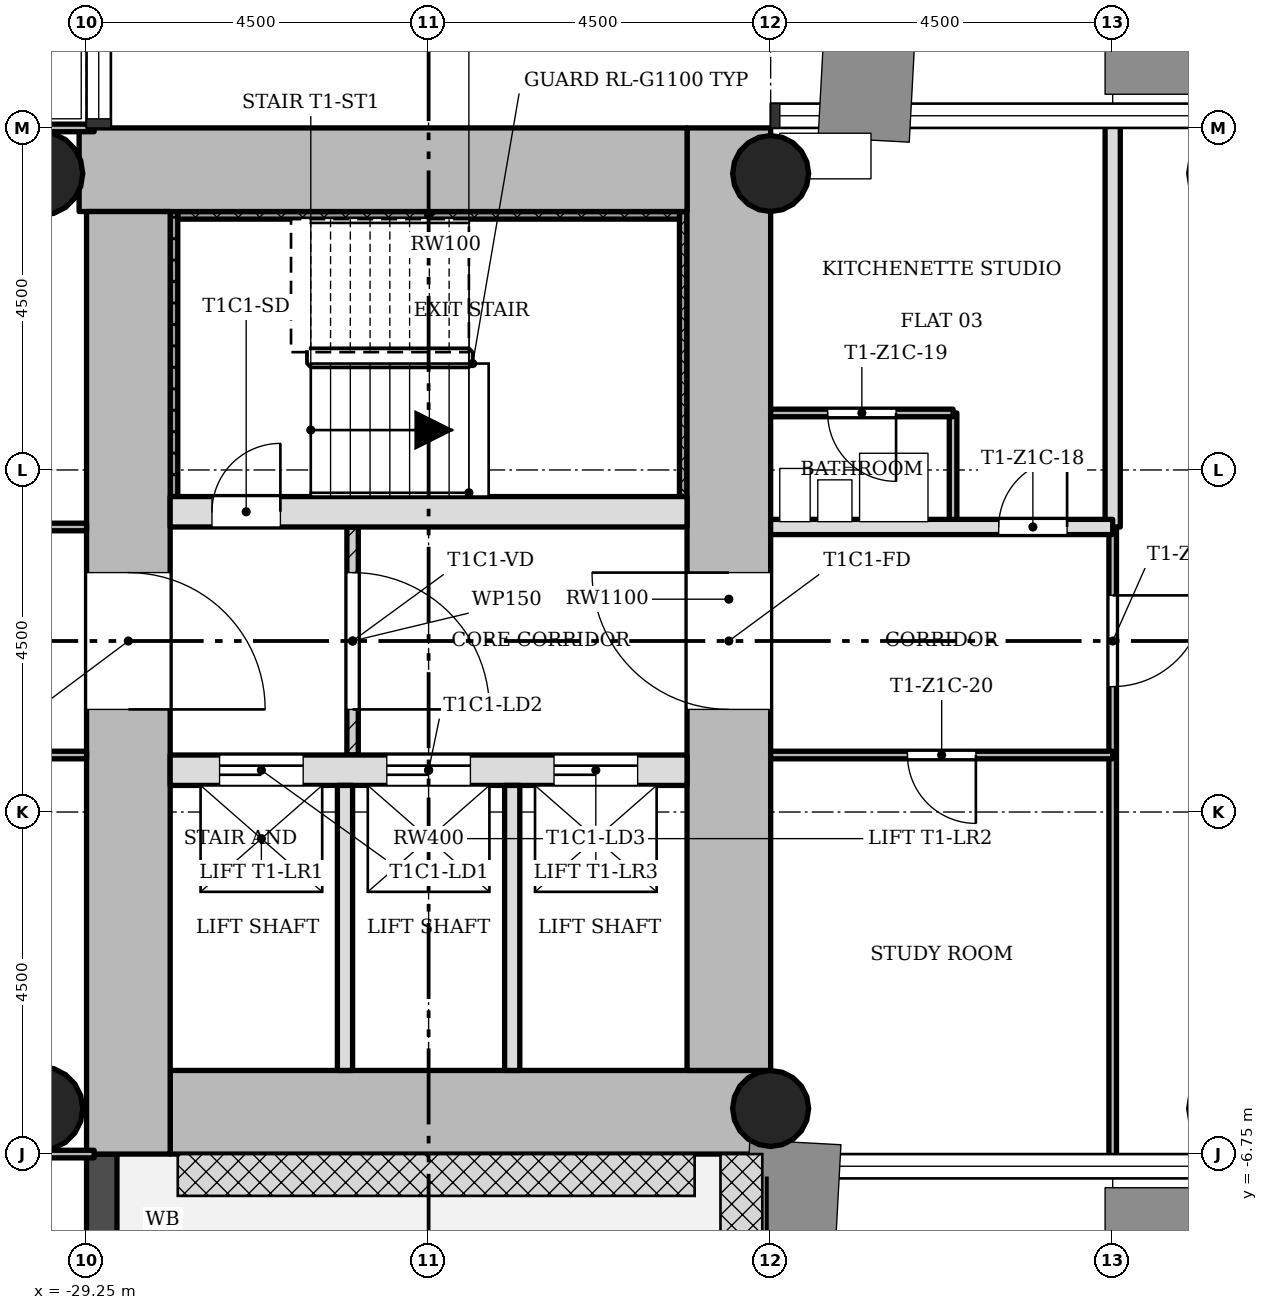
"""IFC4 building model, lengths in metres.
Left out: names, types, materials, properties, quantities, classifications, styles, units other than length and angle.
Written with IfcOpenShell. Run it as: python <this file> out.ifc"""

import sys

from ifc_helpers import new_model, si_unit, direction, frame, frame_2d, origin, origin_2d, place, context, subcontext, project, spatial, rectangle, hollow_circle, extrude, element, fill, save


model = new_model("IFC4")
c1 = context("Model", 3, precision=1e-05, world=origin(), true_north=direction((0.0, 1.0)))
c2 = subcontext(c1, "Body", "Model", "MODEL_VIEW")
j1 = project(units=[si_unit("LENGTHUNIT", "METRE"), si_unit("PLANEANGLEUNIT", "RADIAN")], contexts=[c1])
p1 = place(None, origin())
s1 = spatial("IfcSite", under=j1, at=p1, CompositionType="ELEMENT")
p2 = place(p1, origin())
s2 = spatial("IfcBuilding", under=s1, at=p2, CompositionType="ELEMENT")
p3 = place(p2, frame((0.0, 0.0, 44.9)))
s3 = spatial("IfcBuildingStorey", under=s2, at=p3, CompositionType="ELEMENT", Elevation=44.9)
p4 = place(p3, frame((-28.15, -6.2, 0.0), z_axis=(0.0, 0.0, 1.0), x_axis=(1.0, 0.0, 0.0)))
e1 = element("IfcWall", 1, at=p4, inside=s3, PredefinedType="SHEAR", context=c2, shape_type="SweptSolid", body=[
    extrude(rectangle(XDim=7.9, YDim=1.1, at=frame_2d((3.95, 0.0))), origin(), (0.0, 0.0, 1.0), 3.4),
])
p5 = place(p3, frame((-20.8, -5.65, 0.0), z_axis=(0.0, 0.0, 1.0), x_axis=(0.0, 1.0, 0.0)))
e2 = element("IfcWall", 2, at=p5, inside=s3, PredefinedType="SHEAR", context=c2, shape_type="SweptSolid", body=[
    extrude(rectangle(XDim=12.4, YDim=1.1, at=frame_2d((6.2, 0.0))), origin(), (0.0, 0.0, 1.0), 3.4),
])
p6 = place(p5, frame((4.75, 0.0, 0.0)))
e3 = element("IfcOpeningElement", 3, at=p6, cuts=e2, PredefinedType="OPENING", context=c2, shape_type="SweptSolid", body=[
    extrude(rectangle(XDim=1.8, YDim=2.1, at=frame_2d((0.9, 1.05))), frame((0.0, 0.56, 0.0), z_axis=(0.0, -1.0, 0.0), x_axis=(1.0, 0.0, 0.0)), (0.0, 0.0, 1.0), 1.12),
])
p7 = place(p3, frame((-21.35, 6.2, 0.0), z_axis=(0.0, 0.0, 1.0), x_axis=(-1.0, 0.0, 0.0)))
e4 = element("IfcWall", 4, at=p7, inside=s3, PredefinedType="SHEAR", context=c2, shape_type="SweptSolid", body=[
    extrude(rectangle(XDim=7.998, YDim=1.1, at=frame_2d((3.999, 0.0))), origin(), (0.0, 0.0, 1.0), 3.4),
])
p8 = place(p3, frame((-28.7, 5.65, 0.0), z_axis=(0.0, 0.0, 1.0), x_axis=(0.0, -1.0, 0.0)))
e5 = element("IfcWall", 5, at=p8, inside=s3, PredefinedType="SHEAR", context=c2, shape_type="SweptSolid", body=[
    extrude(rectangle(XDim=12.4, YDim=1.1, at=frame_2d((6.2, 0.0))), origin(), (0.0, 0.0, 1.0), 3.4),
])
p9 = place(p8, frame((4.75, 0.0, 0.0)))
e6 = element("IfcOpeningElement", 6, at=p9, cuts=e5, PredefinedType="OPENING", context=c2, shape_type="SweptSolid", body=[
    extrude(rectangle(XDim=1.8, YDim=2.1, at=frame_2d((0.9, 1.05))), frame((0.0, 0.56, 0.0), z_axis=(0.0, -1.0, 0.0), x_axis=(1.0, 0.0, 0.0)), (0.0, 0.0, 1.0), 1.12),
])
p10 = place(p3, frame((-28.15, -1.7, 0.0), z_axis=(0.0, 0.0, 1.0), x_axis=(1.0, 0.0, 0.0)))
e7 = element("IfcWall", 7, at=p10, inside=s3, PredefinedType="SHEAR", context=c2, shape_type="SweptSolid", body=[
    extrude(rectangle(XDim=6.8, YDim=0.4, at=frame_2d((3.4, 0.0))), origin(), (0.0, 0.0, 1.0), 3.4),
])
p11 = place(p10, frame((0.65, 0.0, 0.0)))
e8 = element("IfcOpeningElement", 8, at=p11, cuts=e7, PredefinedType="OPENING", context=c2, shape_type="SweptSolid", body=[
    extrude(rectangle(XDim=1.1, YDim=2.1, at=frame_2d((0.55, 1.05))), frame((0.0, 0.21, 0.0), z_axis=(0.0, -1.0, 0.0), x_axis=(1.0, 0.0, 0.0)), (0.0, 0.0, 1.0), 0.42),
])
p12 = place(p10, frame((2.85, 0.0, 0.0)))
e9 = element("IfcOpeningElement", 9, at=p12, cuts=e7, PredefinedType="OPENING", context=c2, shape_type="SweptSolid", body=[
    extrude(rectangle(XDim=1.1, YDim=2.1, at=frame_2d((0.55, 1.05))), frame((0.0, 0.21, 0.0), z_axis=(0.0, -1.0, 0.0), x_axis=(1.0, 0.0, 0.0)), (0.0, 0.0, 1.0), 0.42),
])
p13 = place(p10, frame((5.05, 0.0, 0.0)))
e10 = element("IfcOpeningElement", 10, at=p13, cuts=e7, PredefinedType="OPENING", context=c2, shape_type="SweptSolid", body=[
    extrude(rectangle(XDim=1.1, YDim=2.1, at=frame_2d((0.55, 1.05))), frame((0.0, 0.21, 0.0), z_axis=(0.0, -1.0, 0.0), x_axis=(1.0, 0.0, 0.0)), (0.0, 0.0, 1.0), 0.42),
])
p14 = place(p3, frame((-28.15, 1.7, 0.0), z_axis=(0.0, 0.0, 1.0), x_axis=(1.0, 0.0, 0.0)))
e11 = element("IfcWall", 11, at=p14, inside=s3, PredefinedType="SHEAR", context=c2, shape_type="SweptSolid", body=[
    extrude(rectangle(XDim=6.8, YDim=0.4, at=frame_2d((3.4, 0.0))), origin(), (0.0, 0.0, 1.0), 3.4),
])
p15 = place(p14, frame((0.55, 0.0, 0.0)))
e12 = element("IfcOpeningElement", 12, at=p15, cuts=e11, PredefinedType="OPENING", context=c2, shape_type="SweptSolid", body=[
    extrude(rectangle(XDim=0.9, YDim=2.1, at=frame_2d((0.45, 1.05))), frame((0.0, 0.21, 0.0), z_axis=(0.0, -1.0, 0.0), x_axis=(1.0, 0.0, 0.0)), (0.0, 0.0, 1.0), 0.42),
])
for number, where, z_axis, x_axis in (
    (13, (-20.25, -6.15, 0.0), (0.0, 0.0, 1.0), (1.0, 0.0, 0.0)),
    (14, (-20.25, 6.15, 0.0), (0.0, 0.0, 1.0), (1.0, 0.0, 0.0)),
):
    element("IfcColumn", number, at=place(p3, frame(where, z_axis=z_axis, x_axis=x_axis)), inside=s3, PredefinedType="COLUMN", context=c2, shape_type="SweptSolid", body=[
        extrude(hollow_circle(Radius=0.5, WallThickness=0.036, at=origin_2d()), origin(), (0.0, 0.0, 1.0), 3.4),
    ])
for number, where, z_axis, x_axis in (
    (15, (-29.85, -6.15, 0.0), (0.0, 0.0, 1.0), (1.0, 0.0, 0.0)),
    (16, (-29.85, 6.15, 0.0), (0.0, 0.0, 1.0), (1.0, 0.0, 0.0)),
):
    element("IfcColumn", number, at=place(p3, frame(where, z_axis=z_axis, x_axis=x_axis)), inside=s3, PredefinedType="COLUMN", context=c2, shape_type="SweptSolid", body=[
        extrude(hollow_circle(Radius=0.55, WallThickness=0.04, at=origin_2d()), origin(), (0.0, 0.0, 1.0), 3.4),
    ])
p16 = place(p3, frame((-29.05, -11.25, -0.02), z_axis=(0.0, 0.0, 1.0), x_axis=(0.0, 1.0, 0.0)))
e17 = element("IfcWall", 17, at=p16, inside=s3, PredefinedType="STANDARD", context=c2, shape_type="SweptSolid", body=[
    extrude(rectangle(XDim=4.5, YDim=0.4, at=frame_2d((2.25, 0.0))), origin(), (0.0, 0.0, 1.0), 3.12),
])
p17 = place(p16, frame((1.35, 0.0, 0.02)))
e18 = element("IfcOpeningElement", 18, at=p17, cuts=e17, PredefinedType="OPENING", context=c2, shape_type="SweptSolid", body=[
    extrude(rectangle(XDim=1.8, YDim=2.1, at=frame_2d((0.9, 1.05))), frame((0.0, 0.21, 0.0), z_axis=(0.0, -1.0, 0.0), x_axis=(1.0, 0.0, 0.0)), (0.0, 0.0, 1.0), 0.42),
])
p18 = place(p3, frame((-25.75, -1.5, 0.0), z_axis=(0.0, 0.0, 1.0), x_axis=(0.0, 1.0, 0.0)))
e19 = element("IfcWall", 19, at=p18, inside=s3, PredefinedType="PARTITIONING", context=c2, shape_type="SweptSolid", body=[
    extrude(rectangle(XDim=3.0, YDim=0.15, at=frame_2d((1.5, 0.0))), origin(), (0.0, 0.0, 1.0), 3.0),
])
p19 = place(p18, frame((0.6, 0.0, 0.0)))
e20 = element("IfcOpeningElement", 20, at=p19, cuts=e19, PredefinedType="OPENING", context=c2, shape_type="SweptSolid", body=[
    extrude(rectangle(XDim=1.8, YDim=2.1, at=frame_2d((0.9, 1.05))), frame((0.0, 0.085, 0.0), z_axis=(0.0, -1.0, 0.0), x_axis=(1.0, 0.0, 0.0)), (0.0, 0.0, 1.0), 0.17),
])
for number, where, z_axis, x_axis in (
    (21, (-25.85, -5.65, 0.0), (0.0, 0.0, 1.0), (0.0, 1.0, 0.0)),
    (22, (-23.65, -5.65, 0.0), (0.0, 0.0, 1.0), (0.0, 1.0, 0.0)),
):
    element("IfcWall", number, at=place(p3, frame(where, z_axis=z_axis, x_axis=x_axis)), inside=s3, PredefinedType="SOLIDWALL", context=c2, shape_type="SweptSolid", body=[
        extrude(rectangle(XDim=3.75, YDim=0.2, at=frame_2d((1.875, 0.0))), origin(), (0.0, 0.0, 1.0), 3.0),
    ])
p20 = place(p3, frame((-17.85, 1.5, 0.0), z_axis=(0.0, 0.0, 1.0), x_axis=(0.0, 1.0, 0.0)))
e23 = element("IfcWall", 23, at=p20, inside=s3, PredefinedType="PARTITIONING", context=c2, shape_type="SweptSolid", body=[
    extrude(rectangle(XDim=1.5, YDim=0.1, at=frame_2d((0.75, 0.0))), origin(), (0.0, 0.0, 1.0), 3.0),
])
p21 = place(p3, frame((-15.75, -6.85, 0.0), z_axis=(0.0, 0.0, 1.0), x_axis=(0.0, 1.0, 0.0)))
e24 = element("IfcWall", 24, at=p21, inside=s3, PredefinedType="PARTITIONING", context=c2, shape_type="SweptSolid", body=[
    extrude(rectangle(XDim=8.35, YDim=0.1, at=frame_2d((4.175, 0.0))), origin(), (0.0, 0.0, 1.0), 3.0),
])
p22 = place(p21, frame((6.25, 0.0, 0.0)))
e25 = element("IfcOpeningElement", 25, at=p22, cuts=e24, PredefinedType="OPENING", context=c2, shape_type="SweptSolid", body=[
    extrude(rectangle(XDim=1.2, YDim=2.1, at=frame_2d((0.6, 1.05))), frame((0.0, 0.06, 0.0), z_axis=(0.0, -1.0, 0.0), x_axis=(1.0, 0.0, 0.0)), (0.0, 0.0, 1.0), 0.12),
])
p23 = place(p3, frame((-15.75, 1.5, 0.0), z_axis=(0.0, 0.0, 1.0), x_axis=(0.0, 1.0, 0.0)))
e26 = element("IfcWall", 26, at=p23, inside=s3, PredefinedType="SOLIDWALL", context=c2, shape_type="SweptSolid", body=[
    extrude(rectangle(XDim=5.35, YDim=0.2, at=frame_2d((2.675, 0.0))), origin(), (0.0, 0.0, 1.0), 3.0),
])
p24 = place(p3, frame((-35.1, -6.75, 0.0), z_axis=(0.0, 0.0, 1.0), x_axis=(1.0, 0.0, 0.0)))
e27 = element("IfcWall", 27, at=p24, inside=s3, PredefinedType="PARTITIONING", context=c2, shape_type="SweptSolid", body=[
    extrude(rectangle(XDim=5.95, YDim=0.1, at=frame_2d((2.975, 0.0))), origin(), (0.0, 0.0, 1.0), 3.0),
])
p25 = place(p3, frame((-35.1, -1.5, 0.0), z_axis=(0.0, 0.0, 1.0), x_axis=(1.0, 0.0, 0.0)))
e28 = element("IfcWall", 28, at=p25, inside=s3, PredefinedType="PARTITIONING", context=c2, shape_type="SweptSolid", body=[
    extrude(rectangle(XDim=5.85, YDim=0.1, at=frame_2d((2.925, 0.0))), origin(), (0.0, 0.0, 1.0), 3.0),
])
p26 = place(p25, frame((2.475, 0.0, 0.0)))
e29 = element("IfcOpeningElement", 29, at=p26, cuts=e28, PredefinedType="OPENING", context=c2, shape_type="SweptSolid", body=[
    extrude(rectangle(XDim=0.9, YDim=2.1, at=frame_2d((0.45, 1.05))), frame((0.0, 0.06, 0.0), z_axis=(0.0, -1.0, 0.0), x_axis=(1.0, 0.0, 0.0)), (0.0, 0.0, 1.0), 0.12),
])
p27 = place(p3, frame((-20.25, -1.5, 0.0), z_axis=(0.0, 0.0, 1.0), x_axis=(1.0, 0.0, 0.0)))
e30 = element("IfcWall", 30, at=p27, inside=s3, PredefinedType="PARTITIONING", context=c2, shape_type="SweptSolid", body=[
    extrude(rectangle(XDim=4.5, YDim=0.1, at=frame_2d((2.25, 0.0))), origin(), (0.0, 0.0, 1.0), 3.0),
])
p28 = place(p27, frame((1.8, 0.0, 0.0)))
e31 = element("IfcOpeningElement", 31, at=p28, cuts=e30, PredefinedType="OPENING", context=c2, shape_type="SweptSolid", body=[
    extrude(rectangle(XDim=0.9, YDim=2.1, at=frame_2d((0.45, 1.05))), frame((0.0, 0.06, 0.0), z_axis=(0.0, -1.0, 0.0), x_axis=(1.0, 0.0, 0.0)), (0.0, 0.0, 1.0), 0.12),
])
p29 = place(p3, frame((-35.1, 1.5, 0.0), z_axis=(0.0, 0.0, 1.0), x_axis=(1.0, 0.0, 0.0)))
e32 = element("IfcWall", 32, at=p29, inside=s3, PredefinedType="PARTITIONING", context=c2, shape_type="SweptSolid", body=[
    extrude(rectangle(XDim=5.85, YDim=0.1, at=frame_2d((2.925, 0.0))), origin(), (0.0, 0.0, 1.0), 3.0),
])
p30 = place(p29, frame((3.375, 0.0, 0.0)))
e33 = element("IfcOpeningElement", 33, at=p30, cuts=e32, PredefinedType="OPENING", context=c2, shape_type="SweptSolid", body=[
    extrude(rectangle(XDim=0.9, YDim=2.1, at=frame_2d((0.45, 1.05))), frame((0.0, 0.06, 0.0), z_axis=(0.0, -1.0, 0.0), x_axis=(1.0, 0.0, 0.0)), (0.0, 0.0, 1.0), 0.12),
])
p31 = place(p3, frame((-20.25, 1.5, 0.0), z_axis=(0.0, 0.0, 1.0), x_axis=(1.0, 0.0, 0.0)))
e34 = element("IfcWall", 34, at=p31, inside=s3, PredefinedType="SOLIDWALL", context=c2, shape_type="SweptSolid", body=[
    extrude(rectangle(XDim=4.5, YDim=0.2, at=frame_2d((2.25, 0.0))), origin(), (0.0, 0.0, 1.0), 3.0),
])
p32 = place(p31, frame((3.0, 0.0, 0.0)))
e35 = element("IfcOpeningElement", 35, at=p32, cuts=e34, PredefinedType="OPENING", context=c2, shape_type="SweptSolid", body=[
    extrude(rectangle(XDim=0.9, YDim=2.1, at=frame_2d((0.45, 1.05))), frame((0.0, 0.11, 0.0), z_axis=(0.0, -1.0, 0.0), x_axis=(1.0, 0.0, 0.0)), (0.0, 0.0, 1.0), 0.22),
])
p33 = place(p3, frame((-20.25, 3.0, 0.0), z_axis=(0.0, 0.0, 1.0), x_axis=(1.0, 0.0, 0.0)))
e36 = element("IfcWall", 36, at=p33, inside=s3, PredefinedType="PARTITIONING", context=c2, shape_type="SweptSolid", body=[
    extrude(rectangle(XDim=2.4, YDim=0.1, at=frame_2d((1.2, 0.0))), origin(), (0.0, 0.0, 1.0), 3.0),
])
p34 = place(p33, frame((0.75, 0.0, 0.0)))
e37 = element("IfcOpeningElement", 37, at=p34, cuts=e36, PredefinedType="OPENING", context=c2, shape_type="SweptSolid", body=[
    extrude(rectangle(XDim=0.9, YDim=2.1, at=frame_2d((0.45, 1.05))), frame((0.0, 0.06, 0.0), z_axis=(0.0, -1.0, 0.0), x_axis=(1.0, 0.0, 0.0)), (0.0, 0.0, 1.0), 0.12),
])
p35 = place(p3, frame((-35.1, 6.75, 0.0), z_axis=(0.0, 0.0, 1.0), x_axis=(1.0, 0.0, 0.0)))
e38 = element("IfcWall", 38, at=p35, inside=s3, PredefinedType="PARTITIONING", context=c2, shape_type="SweptSolid", body=[
    extrude(rectangle(XDim=5.95, YDim=0.1, at=frame_2d((2.975, 0.0))), origin(), (0.0, 0.0, 1.0), 3.0),
])
p36 = place(p3, frame((-21.4, 1.9, 0.0), z_axis=(0.0, 0.0, 1.0), x_axis=(0.0, 1.0, 0.0)))
e39 = element("IfcWall", 39, at=p36, inside=s3, PredefinedType="SHEAR", context=c2, shape_type="SweptSolid", body=[
    extrude(rectangle(XDim=3.75, YDim=0.1, at=frame_2d((1.875, 0.0))), origin(), (0.0, 0.0, 1.0), 3.4),
])
p37 = place(p3, frame((-28.05, 5.6, 0.0), z_axis=(0.0, 0.0, 1.0), x_axis=(1.0, 0.0, 0.0)))
e40 = element("IfcWall", 40, at=p37, inside=s3, PredefinedType="SHEAR", context=c2, shape_type="SweptSolid", body=[
    extrude(rectangle(XDim=6.6, YDim=0.1, at=frame_2d((3.3, 0.0))), origin(), (0.0, 0.0, 1.0), 3.4),
])
p38 = place(p3, frame((-28.1, 1.9, 0.0), z_axis=(0.0, 0.0, 1.0), x_axis=(0.0, 1.0, 0.0)))
e41 = element("IfcWall", 41, at=p38, inside=s3, PredefinedType="SHEAR", context=c2, shape_type="SweptSolid", body=[
    extrude(rectangle(XDim=3.75, YDim=0.1, at=frame_2d((1.875, 0.0))), origin(), (0.0, 0.0, 1.0), 3.4),
])
p39 = place(p19, origin())
e42 = element("IfcDoor", 42, at=p39, inside=s3, OperationType="SINGLE_SWING_LEFT", PredefinedType="DOOR", context=c2, shape_type="SweptSolid", body=[
    extrude(rectangle(XDim=1.8, YDim=2.1, at=frame_2d((0.9, 1.05))), frame((0.0, 0.025, 0.0), z_axis=(0.0, -1.0, 0.0), x_axis=(1.0, 0.0, 0.0)), (0.0, 0.0, 1.0), 0.05),
])
fill(e20, e42)
p40 = place(p32, origin())
e43 = element("IfcDoor", 43, at=p40, inside=s3, OperationType="SINGLE_SWING_LEFT", PredefinedType="DOOR", context=c2, shape_type="SweptSolid", body=[
    extrude(rectangle(XDim=0.9, YDim=2.1, at=frame_2d((0.45, 1.05))), frame((0.0, 0.025, 0.0), z_axis=(0.0, -1.0, 0.0), x_axis=(1.0, 0.0, 0.0)), (0.0, 0.0, 1.0), 0.05),
])
fill(e35, e43)
p41 = place(p34, origin())
e44 = element("IfcDoor", 44, at=p41, inside=s3, OperationType="SINGLE_SWING_RIGHT", PredefinedType="DOOR", context=c2, shape_type="SweptSolid", body=[
    extrude(rectangle(XDim=0.9, YDim=2.1, at=frame_2d((0.45, 1.05))), frame((0.0, 0.025, 0.0), z_axis=(0.0, -1.0, 0.0), x_axis=(1.0, 0.0, 0.0)), (0.0, 0.0, 1.0), 0.05),
])
fill(e37, e44)
p42 = place(p28, origin())
e45 = element("IfcDoor", 45, at=p42, inside=s3, OperationType="SINGLE_SWING_RIGHT", PredefinedType="DOOR", context=c2, shape_type="SweptSolid", body=[
    extrude(rectangle(XDim=0.9, YDim=2.1, at=frame_2d((0.45, 1.05))), frame((0.0, 0.025, 0.0), z_axis=(0.0, -1.0, 0.0), x_axis=(1.0, 0.0, 0.0)), (0.0, 0.0, 1.0), 0.05),
])
fill(e31, e45)
p43 = place(p22, origin())
e46 = element("IfcDoor", 46, at=p43, inside=s3, OperationType="SINGLE_SWING_RIGHT", PredefinedType="DOOR", context=c2, shape_type="SweptSolid", body=[
    extrude(rectangle(XDim=1.2, YDim=2.1, at=frame_2d((0.6, 1.05))), frame((0.0, 0.025, 0.0), z_axis=(0.0, -1.0, 0.0), x_axis=(1.0, 0.0, 0.0)), (0.0, 0.0, 1.0), 0.05),
])
fill(e25, e46)
p44 = place(p15, origin())
e47 = element("IfcDoor", 47, at=p44, inside=s3, OperationType="SINGLE_SWING_LEFT", PredefinedType="DOOR", context=c2, shape_type="SweptSolid", body=[
    extrude(rectangle(XDim=0.9, YDim=2.1, at=frame_2d((0.45, 1.05))), frame((0.0, 0.025, 0.0), z_axis=(0.0, -1.0, 0.0), x_axis=(1.0, 0.0, 0.0)), (0.0, 0.0, 1.0), 0.05),
])
fill(e12, e47)
p45 = place(p11, origin())
e48 = element("IfcDoor", 48, at=p45, inside=s3, OperationType="SLIDING_TO_LEFT", PredefinedType="DOOR", context=c2, shape_type="SweptSolid", body=[
    extrude(rectangle(XDim=1.1, YDim=2.1, at=frame_2d((0.55, 1.05))), frame((0.0, 0.025, 0.0), z_axis=(0.0, -1.0, 0.0), x_axis=(1.0, 0.0, 0.0)), (0.0, 0.0, 1.0), 0.05),
])
fill(e8, e48)
p46 = place(p12, origin())
e49 = element("IfcDoor", 49, at=p46, inside=s3, OperationType="SLIDING_TO_LEFT", PredefinedType="DOOR", context=c2, shape_type="SweptSolid", body=[
    extrude(rectangle(XDim=1.1, YDim=2.1, at=frame_2d((0.55, 1.05))), frame((0.0, 0.025, 0.0), z_axis=(0.0, -1.0, 0.0), x_axis=(1.0, 0.0, 0.0)), (0.0, 0.0, 1.0), 0.05),
])
fill(e9, e49)
p47 = place(p13, origin())
e50 = element("IfcDoor", 50, at=p47, inside=s3, OperationType="SLIDING_TO_LEFT", PredefinedType="DOOR", context=c2, shape_type="SweptSolid", body=[
    extrude(rectangle(XDim=1.1, YDim=2.1, at=frame_2d((0.55, 1.05))), frame((0.0, 0.025, 0.0), z_axis=(0.0, -1.0, 0.0), x_axis=(1.0, 0.0, 0.0)), (0.0, 0.0, 1.0), 0.05),
])
fill(e10, e50)
p48 = place(p9, origin())
e51 = element("IfcDoor", 51, at=p48, inside=s3, OperationType="SINGLE_SWING_LEFT", PredefinedType="DOOR", context=c2, shape_type="SweptSolid", body=[
    extrude(rectangle(XDim=1.8, YDim=2.1, at=frame_2d((0.9, 1.05))), frame((0.0, 0.025, 0.0), z_axis=(0.0, -1.0, 0.0), x_axis=(1.0, 0.0, 0.0)), (0.0, 0.0, 1.0), 0.05),
])
fill(e6, e51)
p49 = place(p6, origin())
e52 = element("IfcDoor", 52, at=p49, inside=s3, OperationType="SINGLE_SWING_LEFT", PredefinedType="DOOR", context=c2, shape_type="SweptSolid", body=[
    extrude(rectangle(XDim=1.8, YDim=2.1, at=frame_2d((0.9, 1.05))), frame((0.0, 0.025, 0.0), z_axis=(0.0, -1.0, 0.0), x_axis=(1.0, 0.0, 0.0)), (0.0, 0.0, 1.0), 0.05),
])
fill(e3, e52)
save(model, sys.argv[1])
